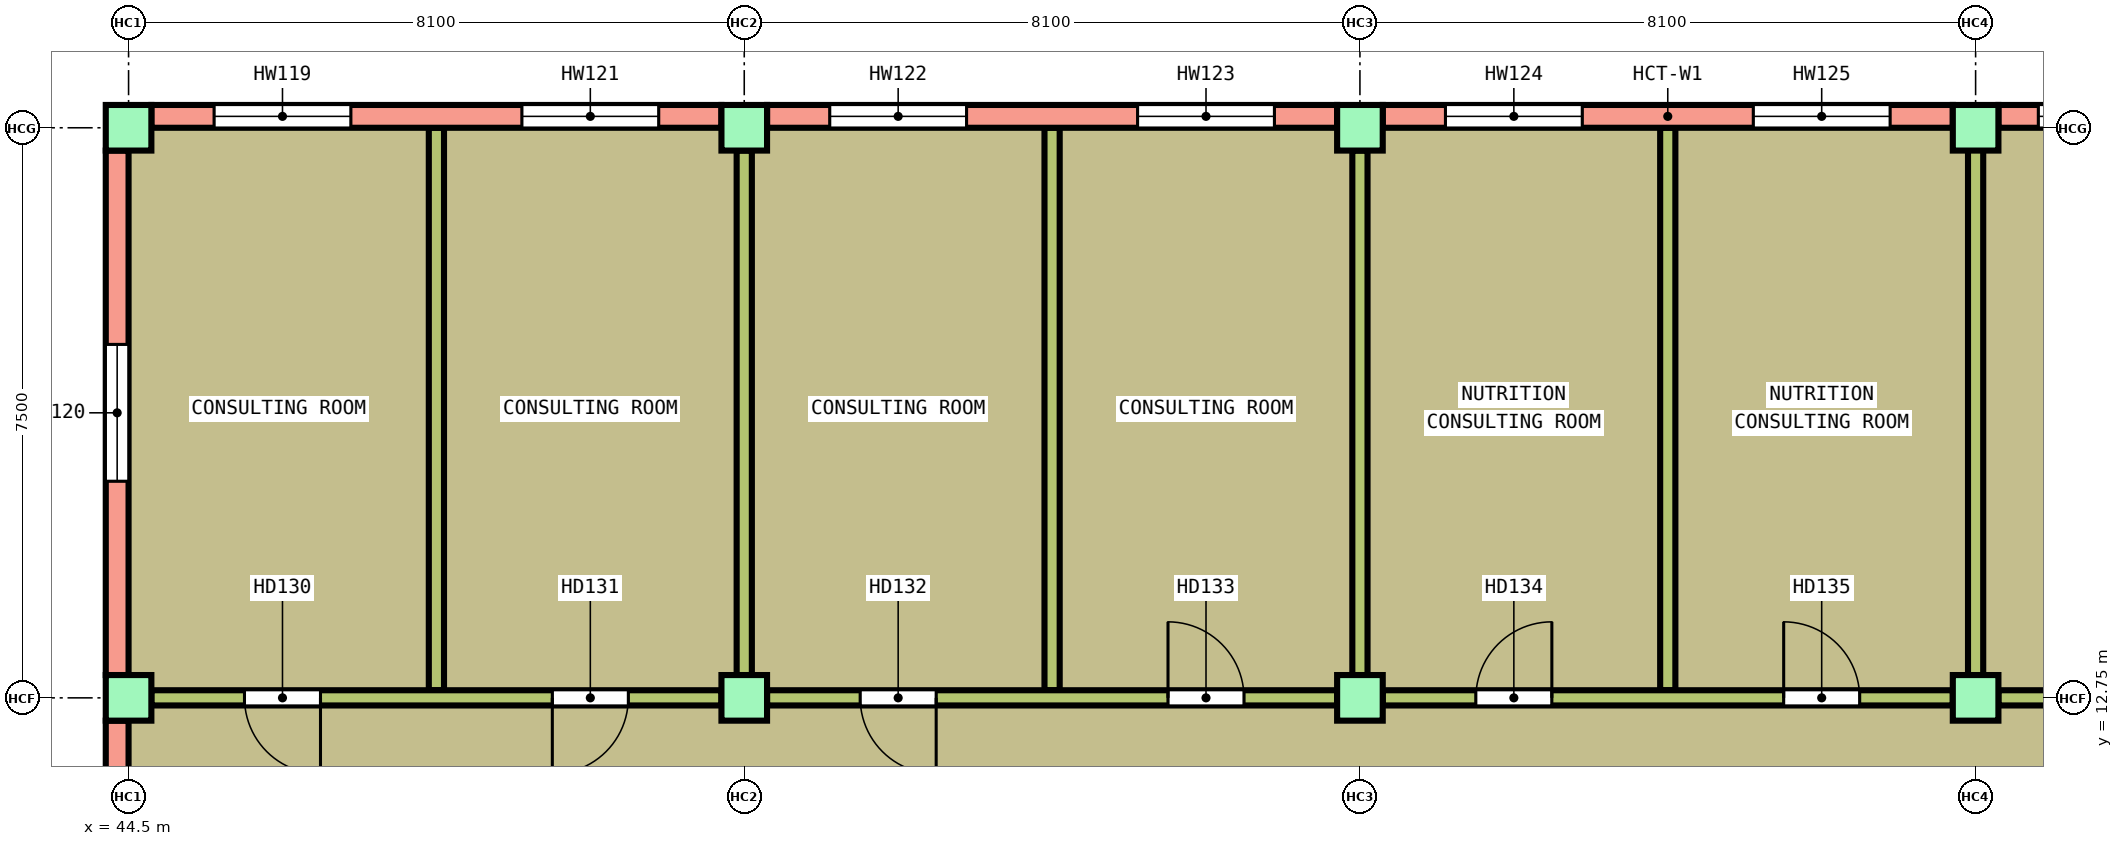
"""IFC4 building model, lengths in metres.
Left out: names, types, materials, properties, quantities, classifications, styles, units other than length and angle.
Written with IfcOpenShell. Run it as: python <this file> out.ifc"""

import sys

from ifc_helpers import new_model, si_unit, direction, frame, frame_2d, origin, origin_2d, place, context, subcontext, project, spatial, rectangle, extrude, element, fill, save


model = new_model("IFC4")
c1 = context("Model", 3, precision=1e-05, world=origin(), true_north=direction((0.0, 1.0)))
c2 = subcontext(c1, "Body", "Model", "MODEL_VIEW")
j1 = project(units=[si_unit("LENGTHUNIT", "METRE"), si_unit("PLANEANGLEUNIT", "RADIAN")], contexts=[c1])
p1 = place(None, origin())
s1 = spatial("IfcSite", under=j1, at=p1, CompositionType="ELEMENT")
p2 = place(p1, origin())
s2 = spatial("IfcBuilding", under=s1, at=p2, CompositionType="ELEMENT")
p3 = place(p2, frame((0.0, 0.0, 5.6)))
s3 = spatial("IfcBuildingStorey", under=s2, at=p3, CompositionType="ELEMENT", Elevation=5.6)
for number, where, z_axis, x_axis in (
    (1, (44.5, 12.75, 0.0), (0.0, 0.0, 1.0), (1.0, 0.0, 0.0)),
    (2, (52.6, 12.75, 0.0), (0.0, 0.0, 1.0), (1.0, 0.0, 0.0)),
    (3, (60.7, 12.75, 0.0), (0.0, 0.0, 1.0), (1.0, 0.0, 0.0)),
    (4, (68.8, 12.75, 0.0), (0.0, 0.0, 1.0), (1.0, 0.0, 0.0)),
    (5, (44.5, 20.25, 0.0), (0.0, 0.0, 1.0), (1.0, 0.0, 0.0)),
    (6, (52.6, 20.25, 0.0), (0.0, 0.0, 1.0), (1.0, 0.0, 0.0)),
    (7, (60.7, 20.25, 0.0), (0.0, 0.0, 1.0), (1.0, 0.0, 0.0)),
    (8, (68.8, 20.25, 0.0), (0.0, 0.0, 1.0), (1.0, 0.0, 0.0)),
):
    element("IfcColumn", number, at=place(p3, frame(where, z_axis=z_axis, x_axis=x_axis)), inside=s3, PredefinedType="COLUMN", context=c2, shape_type="SweptSolid", body=[
        extrude(rectangle(XDim=0.6, YDim=0.6, at=origin_2d()), origin(), (0.0, 0.0, 1.0), 4.6),
    ])
p4 = place(p3, frame((44.35, 10.05, 0.0), z_axis=(0.0, 0.0, 1.0), x_axis=(0.0, 1.0, 0.0)))
e9 = element("IfcWall", 9, at=p4, inside=s3, PredefinedType="SOLIDWALL", context=c2, shape_type="SweptSolid", body=[
    extrude(rectangle(XDim=2.4, YDim=0.3, at=frame_2d((1.2, 0.0))), origin(), (0.0, 0.0, 1.0), 3.8),
])
p5 = place(p3, frame((44.35, 13.05, 0.0), z_axis=(0.0, 0.0, 1.0), x_axis=(0.0, 1.0, 0.0)))
e10 = element("IfcWall", 10, at=p5, inside=s3, PredefinedType="SOLIDWALL", context=c2, shape_type="SweptSolid", body=[
    extrude(rectangle(XDim=6.9, YDim=0.3, at=frame_2d((3.45, 0.0))), origin(), (0.0, 0.0, 1.0), 3.8),
])
p6 = place(p5, frame((2.55, 0.0, 0.9)))
e11 = element("IfcOpeningElement", 11, at=p6, cuts=e10, PredefinedType="OPENING", context=c2, shape_type="SweptSolid", body=[
    extrude(rectangle(XDim=1.8, YDim=1.8, at=frame_2d((0.9, 0.9))), frame((0.0, 0.16, 0.0), z_axis=(0.0, -1.0, 0.0), x_axis=(1.0, 0.0, 0.0)), (0.0, 0.0, 1.0), 0.32),
])
p7 = place(p3, frame((48.55, 12.85, 0.0), z_axis=(0.0, 0.0, 1.0), x_axis=(0.0, 1.0, 0.0)))
e12 = element("IfcWall", 12, at=p7, inside=s3, PredefinedType="PARTITIONING", context=c2, shape_type="SweptSolid", body=[
    extrude(rectangle(XDim=7.4, YDim=0.2, at=frame_2d((3.7, 0.0))), origin(), (0.0, 0.0, 1.0), 3.8),
])
p8 = place(p3, frame((52.6, 13.05, 0.0), z_axis=(0.0, 0.0, 1.0), x_axis=(0.0, 1.0, 0.0)))
e13 = element("IfcWall", 13, at=p8, inside=s3, PredefinedType="PARTITIONING", context=c2, shape_type="SweptSolid", body=[
    extrude(rectangle(XDim=6.9, YDim=0.2, at=frame_2d((3.45, 0.0))), origin(), (0.0, 0.0, 1.0), 3.8),
])
p9 = place(p3, frame((56.65, 12.85, 0.0), z_axis=(0.0, 0.0, 1.0), x_axis=(0.0, 1.0, 0.0)))
e14 = element("IfcWall", 14, at=p9, inside=s3, PredefinedType="PARTITIONING", context=c2, shape_type="SweptSolid", body=[
    extrude(rectangle(XDim=7.4, YDim=0.2, at=frame_2d((3.7, 0.0))), origin(), (0.0, 0.0, 1.0), 3.8),
])
p10 = place(p3, frame((60.7, 13.05, 0.0), z_axis=(0.0, 0.0, 1.0), x_axis=(0.0, 1.0, 0.0)))
e15 = element("IfcWall", 15, at=p10, inside=s3, PredefinedType="PARTITIONING", context=c2, shape_type="SweptSolid", body=[
    extrude(rectangle(XDim=6.9, YDim=0.2, at=frame_2d((3.45, 0.0))), origin(), (0.0, 0.0, 1.0), 3.8),
])
p11 = place(p3, frame((64.75, 12.85, 0.0), z_axis=(0.0, 0.0, 1.0), x_axis=(0.0, 1.0, 0.0)))
e16 = element("IfcWall", 16, at=p11, inside=s3, PredefinedType="PARTITIONING", context=c2, shape_type="SweptSolid", body=[
    extrude(rectangle(XDim=7.4, YDim=0.2, at=frame_2d((3.7, 0.0))), origin(), (0.0, 0.0, 1.0), 3.8),
])
p12 = place(p3, frame((68.8, 12.75, 0.0), z_axis=(0.0, 0.0, 1.0), x_axis=(0.0, 1.0, 0.0)))
e17 = element("IfcWall", 17, at=p12, inside=s3, PredefinedType="PARTITIONING", context=c2, shape_type="SweptSolid", body=[
    extrude(rectangle(XDim=7.5, YDim=0.2, at=frame_2d((3.75, 0.0))), origin(), (0.0, 0.0, 1.0), 3.8),
])
p13 = place(p3, frame((44.8, 12.75, 0.0), z_axis=(0.0, 0.0, 1.0), x_axis=(1.0, 0.0, 0.0)))
e18 = element("IfcWall", 18, at=p13, inside=s3, PredefinedType="PARTITIONING", context=c2, shape_type="SweptSolid", body=[
    extrude(rectangle(XDim=7.5, YDim=0.2, at=frame_2d((3.75, 0.0))), origin(), (0.0, 0.0, 1.0), 3.8),
])
p14 = place(p13, frame((1.225, 0.0, 0.0)))
e19 = element("IfcOpeningElement", 19, at=p14, cuts=e18, PredefinedType="OPENING", context=c2, shape_type="SweptSolid", body=[
    extrude(rectangle(XDim=1.0, YDim=2.1, at=frame_2d((0.5, 1.05))), frame((0.0, 0.11, 0.0), z_axis=(0.0, -1.0, 0.0), x_axis=(1.0, 0.0, 0.0)), (0.0, 0.0, 1.0), 0.22),
])
p15 = place(p13, frame((5.275, 0.0, 0.0)))
e20 = element("IfcOpeningElement", 20, at=p15, cuts=e18, PredefinedType="OPENING", context=c2, shape_type="SweptSolid", body=[
    extrude(rectangle(XDim=1.0, YDim=2.1, at=frame_2d((0.5, 1.05))), frame((0.0, 0.11, 0.0), z_axis=(0.0, -1.0, 0.0), x_axis=(1.0, 0.0, 0.0)), (0.0, 0.0, 1.0), 0.22),
])
p16 = place(p3, frame((52.9, 12.75, 0.0), z_axis=(0.0, 0.0, 1.0), x_axis=(1.0, 0.0, 0.0)))
e21 = element("IfcWall", 21, at=p16, inside=s3, PredefinedType="PARTITIONING", context=c2, shape_type="SweptSolid", body=[
    extrude(rectangle(XDim=7.5, YDim=0.2, at=frame_2d((3.75, 0.0))), origin(), (0.0, 0.0, 1.0), 3.8),
])
p17 = place(p16, frame((1.225, 0.0, 0.0)))
e22 = element("IfcOpeningElement", 22, at=p17, cuts=e21, PredefinedType="OPENING", context=c2, shape_type="SweptSolid", body=[
    extrude(rectangle(XDim=1.0, YDim=2.1, at=frame_2d((0.5, 1.05))), frame((0.0, 0.11, 0.0), z_axis=(0.0, -1.0, 0.0), x_axis=(1.0, 0.0, 0.0)), (0.0, 0.0, 1.0), 0.22),
])
p18 = place(p16, frame((5.275, 0.0, 0.0)))
e23 = element("IfcOpeningElement", 23, at=p18, cuts=e21, PredefinedType="OPENING", context=c2, shape_type="SweptSolid", body=[
    extrude(rectangle(XDim=1.0, YDim=2.1, at=frame_2d((0.5, 1.05))), frame((0.0, 0.11, 0.0), z_axis=(0.0, -1.0, 0.0), x_axis=(1.0, 0.0, 0.0)), (0.0, 0.0, 1.0), 0.22),
])
p19 = place(p3, frame((61.0, 12.75, 0.0), z_axis=(0.0, 0.0, 1.0), x_axis=(1.0, 0.0, 0.0)))
e24 = element("IfcWall", 24, at=p19, inside=s3, PredefinedType="PARTITIONING", context=c2, shape_type="SweptSolid", body=[
    extrude(rectangle(XDim=7.5, YDim=0.2, at=frame_2d((3.75, 0.0))), origin(), (0.0, 0.0, 1.0), 3.8),
])
p20 = place(p19, frame((1.225, 0.0, 0.0)))
e25 = element("IfcOpeningElement", 25, at=p20, cuts=e24, PredefinedType="OPENING", context=c2, shape_type="SweptSolid", body=[
    extrude(rectangle(XDim=1.0, YDim=2.1, at=frame_2d((0.5, 1.05))), frame((0.0, 0.11, 0.0), z_axis=(0.0, -1.0, 0.0), x_axis=(1.0, 0.0, 0.0)), (0.0, 0.0, 1.0), 0.22),
])
p21 = place(p19, frame((5.275, 0.0, 0.0)))
e26 = element("IfcOpeningElement", 26, at=p21, cuts=e24, PredefinedType="OPENING", context=c2, shape_type="SweptSolid", body=[
    extrude(rectangle(XDim=1.0, YDim=2.1, at=frame_2d((0.5, 1.05))), frame((0.0, 0.11, 0.0), z_axis=(0.0, -1.0, 0.0), x_axis=(1.0, 0.0, 0.0)), (0.0, 0.0, 1.0), 0.22),
])
p22 = place(p3, frame((69.1, 12.75, 0.0), z_axis=(0.0, 0.0, 1.0), x_axis=(1.0, 0.0, 0.0)))
e27 = element("IfcWall", 27, at=p22, inside=s3, PredefinedType="PARTITIONING", context=c2, shape_type="SweptSolid", body=[
    extrude(rectangle(XDim=7.5, YDim=0.2, at=frame_2d((3.75, 0.0))), origin(), (0.0, 0.0, 1.0), 3.8),
])
p23 = place(p22, frame((0.825, 0.0, 0.0)))
e28 = element("IfcOpeningElement", 28, at=p23, cuts=e27, PredefinedType="OPENING", context=c2, shape_type="SweptSolid", body=[
    extrude(rectangle(XDim=1.8, YDim=2.1, at=frame_2d((0.9, 1.05))), frame((0.0, 0.11, 0.0), z_axis=(0.0, -1.0, 0.0), x_axis=(1.0, 0.0, 0.0)), (0.0, 0.0, 1.0), 0.22),
])
p24 = place(p3, frame((44.8, 20.4, 0.0), z_axis=(0.0, 0.0, 1.0), x_axis=(1.0, 0.0, 0.0)))
e29 = element("IfcWall", 29, at=p24, inside=s3, PredefinedType="SOLIDWALL", context=c2, shape_type="SweptSolid", body=[
    extrude(rectangle(XDim=7.5, YDim=0.3, at=frame_2d((3.75, 0.0))), origin(), (0.0, 0.0, 1.0), 3.8),
])
p25 = place(p24, frame((0.825, 0.0, 0.9)))
e30 = element("IfcOpeningElement", 30, at=p25, cuts=e29, PredefinedType="OPENING", context=c2, shape_type="SweptSolid", body=[
    extrude(rectangle(XDim=1.8, YDim=1.8, at=frame_2d((0.9, 0.9))), frame((0.0, 0.16, 0.0), z_axis=(0.0, -1.0, 0.0), x_axis=(1.0, 0.0, 0.0)), (0.0, 0.0, 1.0), 0.32),
])
p26 = place(p24, frame((4.875, 0.0, 0.9)))
e31 = element("IfcOpeningElement", 31, at=p26, cuts=e29, PredefinedType="OPENING", context=c2, shape_type="SweptSolid", body=[
    extrude(rectangle(XDim=1.8, YDim=1.8, at=frame_2d((0.9, 0.9))), frame((0.0, 0.16, 0.0), z_axis=(0.0, -1.0, 0.0), x_axis=(1.0, 0.0, 0.0)), (0.0, 0.0, 1.0), 0.32),
])
p27 = place(p3, frame((52.9, 20.4, 0.0), z_axis=(0.0, 0.0, 1.0), x_axis=(1.0, 0.0, 0.0)))
e32 = element("IfcWall", 32, at=p27, inside=s3, PredefinedType="SOLIDWALL", context=c2, shape_type="SweptSolid", body=[
    extrude(rectangle(XDim=7.5, YDim=0.3, at=frame_2d((3.75, 0.0))), origin(), (0.0, 0.0, 1.0), 3.8),
])
p28 = place(p27, frame((0.825, 0.0, 0.9)))
e33 = element("IfcOpeningElement", 33, at=p28, cuts=e32, PredefinedType="OPENING", context=c2, shape_type="SweptSolid", body=[
    extrude(rectangle(XDim=1.8, YDim=1.8, at=frame_2d((0.9, 0.9))), frame((0.0, 0.16, 0.0), z_axis=(0.0, -1.0, 0.0), x_axis=(1.0, 0.0, 0.0)), (0.0, 0.0, 1.0), 0.32),
])
p29 = place(p27, frame((4.875, 0.0, 0.9)))
e34 = element("IfcOpeningElement", 34, at=p29, cuts=e32, PredefinedType="OPENING", context=c2, shape_type="SweptSolid", body=[
    extrude(rectangle(XDim=1.8, YDim=1.8, at=frame_2d((0.9, 0.9))), frame((0.0, 0.16, 0.0), z_axis=(0.0, -1.0, 0.0), x_axis=(1.0, 0.0, 0.0)), (0.0, 0.0, 1.0), 0.32),
])
p30 = place(p3, frame((61.0, 20.4, 0.0), z_axis=(0.0, 0.0, 1.0), x_axis=(1.0, 0.0, 0.0)))
e35 = element("IfcWall", 35, at=p30, inside=s3, PredefinedType="SOLIDWALL", context=c2, shape_type="SweptSolid", body=[
    extrude(rectangle(XDim=7.5, YDim=0.3, at=frame_2d((3.75, 0.0))), origin(), (0.0, 0.0, 1.0), 3.8),
])
p31 = place(p30, frame((0.825, 0.0, 0.9)))
e36 = element("IfcOpeningElement", 36, at=p31, cuts=e35, PredefinedType="OPENING", context=c2, shape_type="SweptSolid", body=[
    extrude(rectangle(XDim=1.8, YDim=1.8, at=frame_2d((0.9, 0.9))), frame((0.0, 0.16, 0.0), z_axis=(0.0, -1.0, 0.0), x_axis=(1.0, 0.0, 0.0)), (0.0, 0.0, 1.0), 0.32),
])
p32 = place(p30, frame((4.875, 0.0, 0.9)))
e37 = element("IfcOpeningElement", 37, at=p32, cuts=e35, PredefinedType="OPENING", context=c2, shape_type="SweptSolid", body=[
    extrude(rectangle(XDim=1.8, YDim=1.8, at=frame_2d((0.9, 0.9))), frame((0.0, 0.16, 0.0), z_axis=(0.0, -1.0, 0.0), x_axis=(1.0, 0.0, 0.0)), (0.0, 0.0, 1.0), 0.32),
])
p33 = place(p3, frame((69.1, 20.4, 0.0), z_axis=(0.0, 0.0, 1.0), x_axis=(1.0, 0.0, 0.0)))
e38 = element("IfcWall", 38, at=p33, inside=s3, PredefinedType="SOLIDWALL", context=c2, shape_type="SweptSolid", body=[
    extrude(rectangle(XDim=7.5, YDim=0.3, at=frame_2d((3.75, 0.0))), origin(), (0.0, 0.0, 1.0), 3.8),
])
p34 = place(p33, frame((0.525, 0.0, 0.3)))
e39 = element("IfcOpeningElement", 39, at=p34, cuts=e38, PredefinedType="OPENING", context=c2, shape_type="SweptSolid", body=[
    extrude(rectangle(XDim=2.4, YDim=2.4, at=frame_2d((1.2, 1.2))), frame((0.0, 0.16, 0.0), z_axis=(0.0, -1.0, 0.0), x_axis=(1.0, 0.0, 0.0)), (0.0, 0.0, 1.0), 0.32),
])
p35 = place(p33, frame((4.575, 0.0, 0.3)))
e40 = element("IfcOpeningElement", 40, at=p35, cuts=e38, PredefinedType="OPENING", context=c2, shape_type="SweptSolid", body=[
    extrude(rectangle(XDim=2.4, YDim=2.4, at=frame_2d((1.2, 1.2))), frame((0.0, 0.16, 0.0), z_axis=(0.0, -1.0, 0.0), x_axis=(1.0, 0.0, 0.0)), (0.0, 0.0, 1.0), 0.32),
])
p36 = place(p14, origin())
e41 = element("IfcDoor", 41, at=p36, inside=s3, OperationType="SINGLE_SWING_LEFT", PredefinedType="DOOR", context=c2, shape_type="SweptSolid", body=[
    extrude(rectangle(XDim=1.0, YDim=2.1, at=frame_2d((0.5, 1.05))), frame((0.0, 0.025, 0.0), z_axis=(0.0, -1.0, 0.0), x_axis=(1.0, 0.0, 0.0)), (0.0, 0.0, 1.0), 0.05),
])
fill(e19, e41)
p37 = place(p15, origin())
e42 = element("IfcDoor", 42, at=p37, inside=s3, OperationType="SINGLE_SWING_RIGHT", PredefinedType="DOOR", context=c2, shape_type="SweptSolid", body=[
    extrude(rectangle(XDim=1.0, YDim=2.1, at=frame_2d((0.5, 1.05))), frame((0.0, 0.025, 0.0), z_axis=(0.0, -1.0, 0.0), x_axis=(1.0, 0.0, 0.0)), (0.0, 0.0, 1.0), 0.05),
])
fill(e20, e42)
p38 = place(p17, origin())
e43 = element("IfcDoor", 43, at=p38, inside=s3, OperationType="SINGLE_SWING_LEFT", PredefinedType="DOOR", context=c2, shape_type="SweptSolid", body=[
    extrude(rectangle(XDim=1.0, YDim=2.1, at=frame_2d((0.5, 1.05))), frame((0.0, 0.025, 0.0), z_axis=(0.0, -1.0, 0.0), x_axis=(1.0, 0.0, 0.0)), (0.0, 0.0, 1.0), 0.05),
])
fill(e22, e43)
p39 = place(p18, origin())
e44 = element("IfcDoor", 44, at=p39, inside=s3, OperationType="SINGLE_SWING_RIGHT", PredefinedType="DOOR", context=c2, shape_type="SweptSolid", body=[
    extrude(rectangle(XDim=1.0, YDim=2.1, at=frame_2d((0.5, 1.05))), frame((0.0, 0.025, 0.0), z_axis=(0.0, -1.0, 0.0), x_axis=(1.0, 0.0, 0.0)), (0.0, 0.0, 1.0), 0.05),
])
fill(e23, e44)
p40 = place(p20, origin())
e45 = element("IfcDoor", 45, at=p40, inside=s3, OperationType="SINGLE_SWING_LEFT", PredefinedType="DOOR", context=c2, shape_type="SweptSolid", body=[
    extrude(rectangle(XDim=1.0, YDim=2.1, at=frame_2d((0.5, 1.05))), frame((0.0, 0.025, 0.0), z_axis=(0.0, -1.0, 0.0), x_axis=(1.0, 0.0, 0.0)), (0.0, 0.0, 1.0), 0.05),
])
fill(e25, e45)
p41 = place(p21, origin())
e46 = element("IfcDoor", 46, at=p41, inside=s3, OperationType="SINGLE_SWING_RIGHT", PredefinedType="DOOR", context=c2, shape_type="SweptSolid", body=[
    extrude(rectangle(XDim=1.0, YDim=2.1, at=frame_2d((0.5, 1.05))), frame((0.0, 0.025, 0.0), z_axis=(0.0, -1.0, 0.0), x_axis=(1.0, 0.0, 0.0)), (0.0, 0.0, 1.0), 0.05),
])
fill(e26, e46)
p42 = place(p25, origin())
e47 = element("IfcWindow", 47, at=p42, inside=s3, PartitioningType="SINGLE_PANEL", PredefinedType="WINDOW", context=c2, shape_type="SweptSolid", body=[
    extrude(rectangle(XDim=1.8, YDim=1.8, at=frame_2d((0.9, 0.9))), frame((0.0, 0.03, 0.0), z_axis=(0.0, -1.0, 0.0), x_axis=(1.0, 0.0, 0.0)), (0.0, 0.0, 1.0), 0.06),
])
fill(e30, e47)
p43 = place(p6, origin())
e48 = element("IfcWindow", 48, at=p43, inside=s3, PartitioningType="SINGLE_PANEL", PredefinedType="WINDOW", context=c2, shape_type="SweptSolid", body=[
    extrude(rectangle(XDim=1.8, YDim=1.8, at=frame_2d((0.9, 0.9))), frame((0.0, 0.03, 0.0), z_axis=(0.0, -1.0, 0.0), x_axis=(1.0, 0.0, 0.0)), (0.0, 0.0, 1.0), 0.06),
])
fill(e11, e48)
p44 = place(p26, origin())
e49 = element("IfcWindow", 49, at=p44, inside=s3, PartitioningType="SINGLE_PANEL", PredefinedType="WINDOW", context=c2, shape_type="SweptSolid", body=[
    extrude(rectangle(XDim=1.8, YDim=1.8, at=frame_2d((0.9, 0.9))), frame((0.0, 0.03, 0.0), z_axis=(0.0, -1.0, 0.0), x_axis=(1.0, 0.0, 0.0)), (0.0, 0.0, 1.0), 0.06),
])
fill(e31, e49)
p45 = place(p28, origin())
e50 = element("IfcWindow", 50, at=p45, inside=s3, PartitioningType="SINGLE_PANEL", PredefinedType="WINDOW", context=c2, shape_type="SweptSolid", body=[
    extrude(rectangle(XDim=1.8, YDim=1.8, at=frame_2d((0.9, 0.9))), frame((0.0, 0.03, 0.0), z_axis=(0.0, -1.0, 0.0), x_axis=(1.0, 0.0, 0.0)), (0.0, 0.0, 1.0), 0.06),
])
fill(e33, e50)
p46 = place(p29, origin())
e51 = element("IfcWindow", 51, at=p46, inside=s3, PartitioningType="SINGLE_PANEL", PredefinedType="WINDOW", context=c2, shape_type="SweptSolid", body=[
    extrude(rectangle(XDim=1.8, YDim=1.8, at=frame_2d((0.9, 0.9))), frame((0.0, 0.03, 0.0), z_axis=(0.0, -1.0, 0.0), x_axis=(1.0, 0.0, 0.0)), (0.0, 0.0, 1.0), 0.06),
])
fill(e34, e51)
p47 = place(p31, origin())
e52 = element("IfcWindow", 52, at=p47, inside=s3, PartitioningType="SINGLE_PANEL", PredefinedType="WINDOW", context=c2, shape_type="SweptSolid", body=[
    extrude(rectangle(XDim=1.8, YDim=1.8, at=frame_2d((0.9, 0.9))), frame((0.0, 0.03, 0.0), z_axis=(0.0, -1.0, 0.0), x_axis=(1.0, 0.0, 0.0)), (0.0, 0.0, 1.0), 0.06),
])
fill(e36, e52)
p48 = place(p32, origin())
e53 = element("IfcWindow", 53, at=p48, inside=s3, PartitioningType="SINGLE_PANEL", PredefinedType="WINDOW", context=c2, shape_type="SweptSolid", body=[
    extrude(rectangle(XDim=1.8, YDim=1.8, at=frame_2d((0.9, 0.9))), frame((0.0, 0.03, 0.0), z_axis=(0.0, -1.0, 0.0), x_axis=(1.0, 0.0, 0.0)), (0.0, 0.0, 1.0), 0.06),
])
fill(e37, e53)
p49 = place(p34, origin())
e54 = element("IfcWindow", 54, at=p49, inside=s3, PartitioningType="DOUBLE_PANEL_VERTICAL", PredefinedType="WINDOW", context=c2, shape_type="SweptSolid", body=[
    extrude(rectangle(XDim=2.4, YDim=2.4, at=frame_2d((1.2, 1.2))), frame((0.0, 0.03, 0.0), z_axis=(0.0, -1.0, 0.0), x_axis=(1.0, 0.0, 0.0)), (0.0, 0.0, 1.0), 0.06),
])
fill(e39, e54)
save(model, sys.argv[1])
